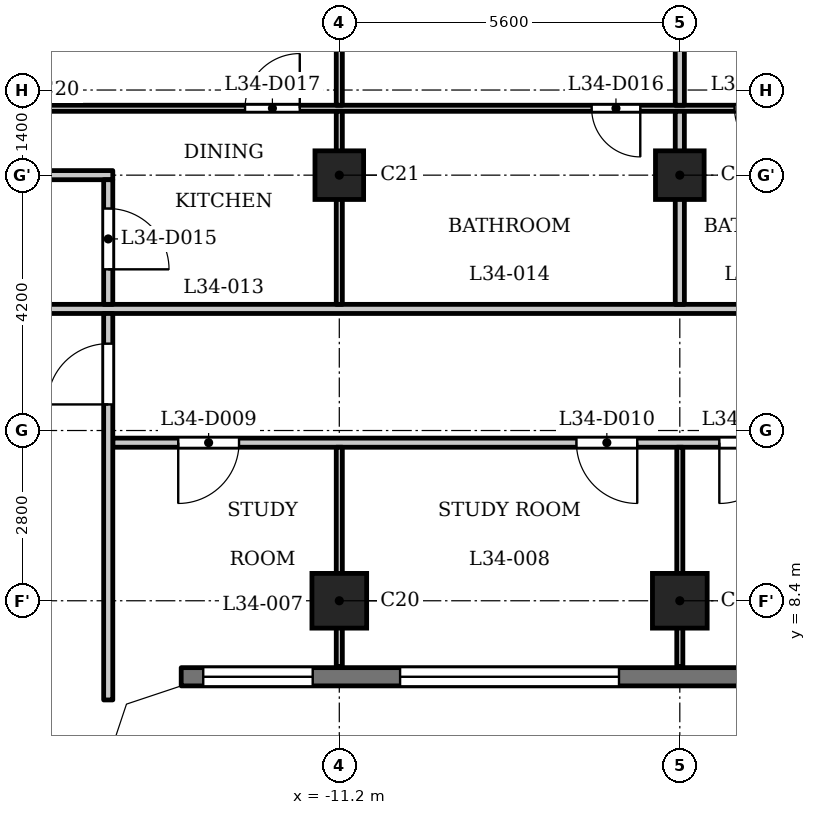
"""IFC4 building model, lengths in metres.
Left out: names, types, materials, properties, quantities, classifications, styles, units other than length and angle.
Written with IfcOpenShell. Run it as: python <this file> out.ifc"""

import sys

from ifc_helpers import new_model, si_unit, direction, frame, frame_2d, origin, origin_2d, place, context, subcontext, project, spatial, polyline, rectangle, outline, extrude, element, fill, save


model = new_model("IFC4")
c1 = context("Model", 3, precision=1e-05, world=origin(), true_north=direction((0.0, 1.0)))
c2 = subcontext(c1, "Body", "Model", "MODEL_VIEW")
j1 = project(units=[si_unit("LENGTHUNIT", "METRE"), si_unit("PLANEANGLEUNIT", "RADIAN")], contexts=[c1])
p1 = place(None, origin())
s1 = spatial("IfcSite", under=j1, at=p1, CompositionType="ELEMENT")
p2 = place(p1, origin())
s2 = spatial("IfcBuilding", under=s1, at=p2, CompositionType="ELEMENT")
p3 = place(p2, frame((0.0, 0.0, 136.1)))
s3 = spatial("IfcBuildingStorey", under=s2, at=p3, CompositionType="ELEMENT", Elevation=136.1)
for number, where, z_axis, x_axis in (
    (1, (-11.2, 8.4, 0.0), (0.0, 0.0, 1.0), (1.0, 0.0, 0.0)),
    (2, (-5.6, 8.4, 0.0), (0.0, 0.0, 1.0), (1.0, 0.0, 0.0)),
):
    element("IfcColumn", number, at=place(p3, frame(where, z_axis=z_axis, x_axis=x_axis)), inside=s3, PredefinedType="COLUMN", context=c2, shape_type="SweptSolid", body=[
        extrude(rectangle(XDim=0.9, YDim=0.9, at=origin_2d()), origin(), (0.0, 0.0, 1.0), 3.5),
    ])
for number, where, z_axis, x_axis in (
    (3, (-11.2, 15.4, 0.0), (0.0, 0.0, 1.0), (1.0, 0.0, 0.0)),
    (4, (-5.6, 15.4, 0.0), (0.0, 0.0, 1.0), (1.0, 0.0, 0.0)),
):
    element("IfcColumn", number, at=place(p3, frame(where, z_axis=z_axis, x_axis=x_axis)), inside=s3, PredefinedType="COLUMN", context=c2, shape_type="SweptSolid", body=[
        extrude(rectangle(XDim=0.8, YDim=0.8, at=origin_2d()), origin(), (0.0, 0.0, 1.0), 3.5),
    ])
p4 = place(p3, frame((-13.8, 7.15, 0.0), z_axis=(0.0, 0.0, 1.0), x_axis=(1.0, 0.0, 0.0)))
e5 = element("IfcWall", 5, at=p4, inside=s3, PredefinedType="SOLIDWALL", context=c2, shape_type="SweptSolid", body=[
    extrude(rectangle(XDim=27.6, YDim=0.3, at=frame_2d((13.8, 0.0))), origin(), (0.0, 0.0, 1.0), 3.2),
])
p5 = place(p4, frame((0.363, 0.0, 0.9)))
e6 = element("IfcOpeningElement", 6, at=p5, cuts=e5, PredefinedType="OPENING", context=c2, shape_type="SweptSolid", body=[
    extrude(rectangle(XDim=1.8, YDim=1.25, at=frame_2d((0.9, 0.625))), frame((0.0, 0.16, 0.0), z_axis=(0.0, -1.0, 0.0), x_axis=(1.0, 0.0, 0.0)), (0.0, 0.0, 1.0), 0.32),
])
p6 = place(p4, frame((3.6, 0.0, 1.2)))
e7 = element("IfcOpeningElement", 7, at=p6, cuts=e5, PredefinedType="OPENING", context=c2, shape_type="SweptSolid", body=[
    extrude(rectangle(XDim=3.6, YDim=0.95, at=frame_2d((1.8, 0.475))), frame((0.0, 0.16, 0.0), z_axis=(0.0, -1.0, 0.0), x_axis=(1.0, 0.0, 0.0)), (0.0, 0.0, 1.0), 0.32),
])
p7 = place(p4, frame((9.2, 0.0, 1.2)))
e8 = element("IfcOpeningElement", 8, at=p7, cuts=e5, PredefinedType="OPENING", context=c2, shape_type="SweptSolid", body=[
    extrude(rectangle(XDim=3.6, YDim=0.95, at=frame_2d((1.8, 0.475))), frame((0.0, 0.16, 0.0), z_axis=(0.0, -1.0, 0.0), x_axis=(1.0, 0.0, 0.0)), (0.0, 0.0, 1.0), 0.32),
])
p8 = place(p4, frame((14.8, 0.0, 1.2)))
e9 = element("IfcOpeningElement", 9, at=p8, cuts=e5, PredefinedType="OPENING", context=c2, shape_type="SweptSolid", body=[
    extrude(rectangle(XDim=3.6, YDim=0.95, at=frame_2d((1.8, 0.475))), frame((0.0, 0.16, 0.0), z_axis=(0.0, -1.0, 0.0), x_axis=(1.0, 0.0, 0.0)), (0.0, 0.0, 1.0), 0.32),
])
p9 = place(p4, frame((20.4, 0.0, 1.2)))
e10 = element("IfcOpeningElement", 10, at=p9, cuts=e5, PredefinedType="OPENING", context=c2, shape_type="SweptSolid", body=[
    extrude(rectangle(XDim=3.6, YDim=0.95, at=frame_2d((1.8, 0.475))), frame((0.0, 0.16, 0.0), z_axis=(0.0, -1.0, 0.0), x_axis=(1.0, 0.0, 0.0)), (0.0, 0.0, 1.0), 0.32),
])
p10 = place(p4, frame((25.438, 0.0, 0.9)))
e11 = element("IfcOpeningElement", 11, at=p10, cuts=e5, PredefinedType="OPENING", context=c2, shape_type="SweptSolid", body=[
    extrude(rectangle(XDim=1.8, YDim=1.25, at=frame_2d((0.9, 0.625))), frame((0.0, 0.16, 0.0), z_axis=(0.0, -1.0, 0.0), x_axis=(1.0, 0.0, 0.0)), (0.0, 0.0, 1.0), 0.32),
])
p11 = place(p3, frame((-14.925, 11.0, 0.0), z_axis=(0.0, 0.0, 1.0), x_axis=(1.0, 0.0, 0.0)))
e12 = element("IfcWall", 12, at=p11, inside=s3, PredefinedType="PARTITIONING", context=c2, shape_type="SweptSolid", body=[
    extrude(rectangle(XDim=29.85, YDim=0.15, at=frame_2d((14.925, 0.0))), origin(), (0.0, 0.0, 1.0), 3.2),
])
p12 = place(p11, frame((1.076, 0.0, 0.0)))
e13 = element("IfcOpeningElement", 13, at=p12, cuts=e12, PredefinedType="OPENING", context=c2, shape_type="SweptSolid", body=[
    extrude(rectangle(XDim=1.0, YDim=2.1, at=frame_2d((0.5, 1.05))), frame((0.0, 0.085, 0.0), z_axis=(0.0, -1.0, 0.0), x_axis=(1.0, 0.0, 0.0)), (0.0, 0.0, 1.0), 0.17),
])
p13 = place(p11, frame((7.625, 0.0, 0.0)))
e14 = element("IfcOpeningElement", 14, at=p13, cuts=e12, PredefinedType="OPENING", context=c2, shape_type="SweptSolid", body=[
    extrude(rectangle(XDim=1.0, YDim=2.1, at=frame_2d((0.5, 1.05))), frame((0.0, 0.085, 0.0), z_axis=(0.0, -1.0, 0.0), x_axis=(1.0, 0.0, 0.0)), (0.0, 0.0, 1.0), 0.17),
])
p14 = place(p11, frame((9.975, 0.0, 0.0)))
e15 = element("IfcOpeningElement", 15, at=p14, cuts=e12, PredefinedType="OPENING", context=c2, shape_type="SweptSolid", body=[
    extrude(rectangle(XDim=1.0, YDim=2.1, at=frame_2d((0.5, 1.05))), frame((0.0, 0.085, 0.0), z_axis=(0.0, -1.0, 0.0), x_axis=(1.0, 0.0, 0.0)), (0.0, 0.0, 1.0), 0.17),
])
p15 = place(p11, frame((18.825, 0.0, 0.0)))
e16 = element("IfcOpeningElement", 16, at=p15, cuts=e12, PredefinedType="OPENING", context=c2, shape_type="SweptSolid", body=[
    extrude(rectangle(XDim=1.0, YDim=2.1, at=frame_2d((0.5, 1.05))), frame((0.0, 0.085, 0.0), z_axis=(0.0, -1.0, 0.0), x_axis=(1.0, 0.0, 0.0)), (0.0, 0.0, 1.0), 0.17),
])
p16 = place(p11, frame((21.175, 0.0, 0.0)))
e17 = element("IfcOpeningElement", 17, at=p16, cuts=e12, PredefinedType="OPENING", context=c2, shape_type="SweptSolid", body=[
    extrude(rectangle(XDim=1.0, YDim=2.1, at=frame_2d((0.5, 1.05))), frame((0.0, 0.085, 0.0), z_axis=(0.0, -1.0, 0.0), x_axis=(1.0, 0.0, 0.0)), (0.0, 0.0, 1.0), 0.17),
])
p17 = place(p11, frame((27.775, 0.0, 0.0)))
e18 = element("IfcOpeningElement", 18, at=p17, cuts=e12, PredefinedType="OPENING", context=c2, shape_type="SweptSolid", body=[
    extrude(rectangle(XDim=1.0, YDim=2.1, at=frame_2d((0.5, 1.05))), frame((0.0, 0.085, 0.0), z_axis=(0.0, -1.0, 0.0), x_axis=(1.0, 0.0, 0.0)), (0.0, 0.0, 1.0), 0.17),
])
p18 = place(p3, frame((-17.4, 13.2, 0.0), z_axis=(0.0, 0.0, 1.0), x_axis=(1.0, 0.0, 0.0)))
e19 = element("IfcWall", 19, at=p18, inside=s3, PredefinedType="PARTITIONING", context=c2, shape_type="SweptSolid", body=[
    extrude(rectangle(XDim=34.8, YDim=0.15, at=frame_2d((17.4, 0.0))), origin(), (0.0, 0.0, 1.0), 3.2),
])
p19 = place(p18, frame((0.25, 0.0, 0.0)))
e20 = element("IfcOpeningElement", 20, at=p19, cuts=e19, PredefinedType="OPENING", context=c2, shape_type="SweptSolid", body=[
    extrude(rectangle(XDim=1.0, YDim=2.1, at=frame_2d((0.5, 1.05))), frame((0.0, 0.085, 0.0), z_axis=(0.0, -1.0, 0.0), x_axis=(1.0, 0.0, 0.0)), (0.0, 0.0, 1.0), 0.17),
])
p20 = place(p18, frame((33.65, 0.0, 0.0)))
e21 = element("IfcOpeningElement", 21, at=p20, cuts=e19, PredefinedType="OPENING", context=c2, shape_type="SweptSolid", body=[
    extrude(rectangle(XDim=1.0, YDim=2.1, at=frame_2d((0.5, 1.05))), frame((0.0, 0.085, 0.0), z_axis=(0.0, -1.0, 0.0), x_axis=(1.0, 0.0, 0.0)), (0.0, 0.0, 1.0), 0.17),
])
p21 = place(p18, frame((15.75, 0.0, 0.0)))
e22 = element("IfcOpeningElement", 22, at=p21, cuts=e19, PredefinedType="OPENING", context=c2, shape_type="SweptSolid", body=[
    extrude(rectangle(XDim=1.0, YDim=2.1, at=frame_2d((0.5, 1.05))), frame((0.0, 0.085, 0.0), z_axis=(0.0, -1.0, 0.0), x_axis=(1.0, 0.0, 0.0)), (0.0, 0.0, 1.0), 0.17),
])
p22 = place(p18, frame((19.35, 0.0, 0.0)))
e23 = element("IfcOpeningElement", 23, at=p22, cuts=e19, PredefinedType="OPENING", context=c2, shape_type="SweptSolid", body=[
    extrude(rectangle(XDim=1.0, YDim=2.1, at=frame_2d((0.5, 1.05))), frame((0.0, 0.085, 0.0), z_axis=(0.0, -1.0, 0.0), x_axis=(1.0, 0.0, 0.0)), (0.0, 0.0, 1.0), 0.17),
])
p23 = place(p18, frame((26.95, 0.0, 0.0)))
e24 = element("IfcOpeningElement", 24, at=p23, cuts=e19, PredefinedType="OPENING", context=c2, shape_type="SweptSolid", body=[
    extrude(rectangle(XDim=1.0, YDim=2.1, at=frame_2d((0.5, 1.05))), frame((0.0, 0.085, 0.0), z_axis=(0.0, -1.0, 0.0), x_axis=(1.0, 0.0, 0.0)), (0.0, 0.0, 1.0), 0.17),
])
p24 = place(p18, frame((29.75, 0.0, 0.0)))
e25 = element("IfcOpeningElement", 25, at=p24, cuts=e19, PredefinedType="OPENING", context=c2, shape_type="SweptSolid", body=[
    extrude(rectangle(XDim=1.0, YDim=2.1, at=frame_2d((0.5, 1.05))), frame((0.0, 0.085, 0.0), z_axis=(0.0, -1.0, 0.0), x_axis=(1.0, 0.0, 0.0)), (0.0, 0.0, 1.0), 0.17),
])
p25 = place(p3, frame((-27.484, 15.4, 0.0), z_axis=(0.0, 0.0, 1.0), x_axis=(1.0, 0.0, 0.0)))
e26 = element("IfcWall", 26, at=p25, inside=s3, PredefinedType="PARTITIONING", context=c2, shape_type="SweptSolid", body=[
    extrude(rectangle(XDim=12.559, YDim=0.15, at=frame_2d((6.279, 0.0))), origin(), (0.0, 0.0, 1.0), 3.2),
])
p26 = place(p25, frame((9.034, 0.0, 0.0)))
e27 = element("IfcOpeningElement", 27, at=p26, cuts=e26, PredefinedType="OPENING", context=c2, shape_type="SweptSolid", body=[
    extrude(rectangle(XDim=1.0, YDim=2.1, at=frame_2d((0.5, 1.05))), frame((0.0, 0.085, 0.0), z_axis=(0.0, -1.0, 0.0), x_axis=(1.0, 0.0, 0.0)), (0.0, 0.0, 1.0), 0.17),
])
p27 = place(p3, frame((-16.725, 16.5, 0.0), z_axis=(0.0, 0.0, 1.0), x_axis=(1.0, 0.0, 0.0)))
e28 = element("IfcWall", 28, at=p27, inside=s3, PredefinedType="PARTITIONING", context=c2, shape_type="SweptSolid", body=[
    extrude(rectangle(XDim=33.45, YDim=0.1, at=frame_2d((16.725, 0.0))), origin(), (0.0, 0.0, 1.0), 3.2),
])
p28 = place(p27, frame((9.675, 0.0, 0.0)))
e29 = element("IfcOpeningElement", 29, at=p28, cuts=e28, PredefinedType="OPENING", context=c2, shape_type="SweptSolid", body=[
    extrude(rectangle(XDim=0.8, YDim=2.1, at=frame_2d((0.4, 1.05))), frame((0.0, 0.06, 0.0), z_axis=(0.0, -1.0, 0.0), x_axis=(1.0, 0.0, 0.0)), (0.0, 0.0, 1.0), 0.12),
])
p29 = place(p27, frame((3.975, 0.0, 0.0)))
e30 = element("IfcOpeningElement", 30, at=p29, cuts=e28, PredefinedType="OPENING", context=c2, shape_type="SweptSolid", body=[
    extrude(rectangle(XDim=0.9, YDim=2.1, at=frame_2d((0.45, 1.05))), frame((0.0, 0.06, 0.0), z_axis=(0.0, -1.0, 0.0), x_axis=(1.0, 0.0, 0.0)), (0.0, 0.0, 1.0), 0.12),
])
p30 = place(p27, frame((12.025, 0.0, 0.0)))
e31 = element("IfcOpeningElement", 31, at=p30, cuts=e28, PredefinedType="OPENING", context=c2, shape_type="SweptSolid", body=[
    extrude(rectangle(XDim=0.8, YDim=2.1, at=frame_2d((0.4, 1.05))), frame((0.0, 0.06, 0.0), z_axis=(0.0, -1.0, 0.0), x_axis=(1.0, 0.0, 0.0)), (0.0, 0.0, 1.0), 0.12),
])
p31 = place(p27, frame((15.175, 0.0, 0.0)))
e32 = element("IfcOpeningElement", 32, at=p31, cuts=e28, PredefinedType="OPENING", context=c2, shape_type="SweptSolid", body=[
    extrude(rectangle(XDim=0.9, YDim=2.1, at=frame_2d((0.45, 1.05))), frame((0.0, 0.06, 0.0), z_axis=(0.0, -1.0, 0.0), x_axis=(1.0, 0.0, 0.0)), (0.0, 0.0, 1.0), 0.12),
])
p32 = place(p27, frame((20.975, 0.0, 0.0)))
e33 = element("IfcOpeningElement", 33, at=p32, cuts=e28, PredefinedType="OPENING", context=c2, shape_type="SweptSolid", body=[
    extrude(rectangle(XDim=0.8, YDim=2.1, at=frame_2d((0.4, 1.05))), frame((0.0, 0.06, 0.0), z_axis=(0.0, -1.0, 0.0), x_axis=(1.0, 0.0, 0.0)), (0.0, 0.0, 1.0), 0.12),
])
p33 = place(p27, frame((18.175, 0.0, 0.0)))
e34 = element("IfcOpeningElement", 34, at=p33, cuts=e28, PredefinedType="OPENING", context=c2, shape_type="SweptSolid", body=[
    extrude(rectangle(XDim=0.9, YDim=2.1, at=frame_2d((0.45, 1.05))), frame((0.0, 0.06, 0.0), z_axis=(0.0, -1.0, 0.0), x_axis=(1.0, 0.0, 0.0)), (0.0, 0.0, 1.0), 0.12),
])
p34 = place(p27, frame((23.725, 0.0, 0.0)))
e35 = element("IfcOpeningElement", 35, at=p34, cuts=e28, PredefinedType="OPENING", context=c2, shape_type="SweptSolid", body=[
    extrude(rectangle(XDim=0.8, YDim=2.1, at=frame_2d((0.4, 1.05))), frame((0.0, 0.06, 0.0), z_axis=(0.0, -1.0, 0.0), x_axis=(1.0, 0.0, 0.0)), (0.0, 0.0, 1.0), 0.12),
])
p35 = place(p27, frame((26.125, 0.0, 0.0)))
e36 = element("IfcOpeningElement", 36, at=p35, cuts=e28, PredefinedType="OPENING", context=c2, shape_type="SweptSolid", body=[
    extrude(rectangle(XDim=0.9, YDim=2.1, at=frame_2d((0.45, 1.05))), frame((0.0, 0.06, 0.0), z_axis=(0.0, -1.0, 0.0), x_axis=(1.0, 0.0, 0.0)), (0.0, 0.0, 1.0), 0.12),
])
p36 = place(p27, frame((32.125, 0.0, 0.0)))
e37 = element("IfcOpeningElement", 37, at=p36, cuts=e28, PredefinedType="OPENING", context=c2, shape_type="SweptSolid", body=[
    extrude(rectangle(XDim=0.8, YDim=2.1, at=frame_2d((0.4, 1.05))), frame((0.0, 0.06, 0.0), z_axis=(0.0, -1.0, 0.0), x_axis=(1.0, 0.0, 0.0)), (0.0, 0.0, 1.0), 0.12),
])
p37 = place(p27, frame((28.975, 0.0, 0.0)))
e38 = element("IfcOpeningElement", 38, at=p37, cuts=e28, PredefinedType="OPENING", context=c2, shape_type="SweptSolid", body=[
    extrude(rectangle(XDim=0.9, YDim=2.1, at=frame_2d((0.45, 1.05))), frame((0.0, 0.06, 0.0), z_axis=(0.0, -1.0, 0.0), x_axis=(1.0, 0.0, 0.0)), (0.0, 0.0, 1.0), 0.12),
])
p38 = place(p3, frame((-15.0, 6.769, 0.0), z_axis=(0.0, 0.0, 1.0), x_axis=(0.0, 1.0, 0.0)))
e39 = element("IfcWall", 39, at=p38, inside=s3, PredefinedType="PARTITIONING", context=c2, shape_type="SweptSolid", body=[
    extrude(rectangle(XDim=6.356, YDim=0.15, at=frame_2d((3.178, 0.0))), origin(), (0.0, 0.0, 1.0), 3.2),
])
p39 = place(p38, frame((4.86, 0.0, 0.0)))
e40 = element("IfcOpeningElement", 40, at=p39, cuts=e39, PredefinedType="OPENING", context=c2, shape_type="SweptSolid", body=[
    extrude(rectangle(XDim=1.0, YDim=2.1, at=frame_2d((0.5, 1.05))), frame((0.0, 0.085, 0.0), z_axis=(0.0, -1.0, 0.0), x_axis=(1.0, 0.0, 0.0)), (0.0, 0.0, 1.0), 0.17),
])
p40 = place(p3, frame((-15.0, 13.275, 0.0), z_axis=(0.0, 0.0, 1.0), x_axis=(0.0, 1.0, 0.0)))
e41 = element("IfcWall", 41, at=p40, inside=s3, PredefinedType="PARTITIONING", context=c2, shape_type="SweptSolid", body=[
    extrude(rectangle(XDim=2.05, YDim=0.15, at=frame_2d((1.025, 0.0))), origin(), (0.0, 0.0, 1.0), 3.2),
])
p41 = place(p40, frame((0.576, 0.0, 0.0)))
e42 = element("IfcOpeningElement", 42, at=p41, cuts=e41, PredefinedType="OPENING", context=c2, shape_type="SweptSolid", body=[
    extrude(rectangle(XDim=1.0, YDim=2.1, at=frame_2d((0.5, 1.05))), frame((0.0, 0.085, 0.0), z_axis=(0.0, -1.0, 0.0), x_axis=(1.0, 0.0, 0.0)), (0.0, 0.0, 1.0), 0.17),
])
p42 = place(p3, frame((-11.2, 7.32, 0.0), z_axis=(0.0, 0.0, 1.0), x_axis=(0.0, 1.0, 0.0)))
e43 = element("IfcWall", 43, at=p42, inside=s3, PredefinedType="PARTITIONING", context=c2, shape_type="SweptSolid", body=[
    extrude(rectangle(XDim=3.605, YDim=0.1, at=frame_2d((1.802, 0.0))), origin(), (0.0, 0.0, 1.0), 3.2),
])
p43 = place(p3, frame((-11.2, 13.275, 0.0), z_axis=(0.0, 0.0, 1.0), x_axis=(0.0, 1.0, 0.0)))
e44 = element("IfcWall", 44, at=p43, inside=s3, PredefinedType="PARTITIONING", context=c2, shape_type="SweptSolid", body=[
    extrude(rectangle(XDim=3.175, YDim=0.1, at=frame_2d((1.587, 0.0))), origin(), (0.0, 0.0, 1.0), 3.2),
])
p44 = place(p3, frame((-11.2, 16.55, 0.0), z_axis=(0.0, 0.0, 1.0), x_axis=(0.0, 1.0, 0.0)))
e45 = element("IfcWall", 45, at=p44, inside=s3, PredefinedType="PARTITIONING", context=c2, shape_type="SweptSolid", body=[
    extrude(rectangle(XDim=6.38, YDim=0.1, at=frame_2d((3.19, 0.0))), origin(), (0.0, 0.0, 1.0), 3.2),
])
p45 = place(p44, frame((4.1, 0.0, 0.0)))
e46 = element("IfcOpeningElement", 46, at=p45, cuts=e45, PredefinedType="OPENING", context=c2, shape_type="SweptSolid", body=[
    extrude(rectangle(XDim=0.9, YDim=2.1, at=frame_2d((0.45, 1.05))), frame((0.0, 0.06, 0.0), z_axis=(0.0, -1.0, 0.0), x_axis=(1.0, 0.0, 0.0)), (0.0, 0.0, 1.0), 0.12),
])
p46 = place(p3, frame((-5.6, 7.32, 0.0), z_axis=(0.0, 0.0, 1.0), x_axis=(0.0, 1.0, 0.0)))
e47 = element("IfcWall", 47, at=p46, inside=s3, PredefinedType="PARTITIONING", context=c2, shape_type="SweptSolid", body=[
    extrude(rectangle(XDim=3.605, YDim=0.1, at=frame_2d((1.802, 0.0))), origin(), (0.0, 0.0, 1.0), 3.2),
])
p47 = place(p3, frame((-5.6, 13.275, 0.0), z_axis=(0.0, 0.0, 1.0), x_axis=(0.0, 1.0, 0.0)))
e48 = element("IfcWall", 48, at=p47, inside=s3, PredefinedType="PARTITIONING", context=c2, shape_type="SweptSolid", body=[
    extrude(rectangle(XDim=3.175, YDim=0.15, at=frame_2d((1.587, 0.0))), origin(), (0.0, 0.0, 1.0), 3.2),
])
p48 = place(p3, frame((-5.6, 16.55, 0.0), z_axis=(0.0, 0.0, 1.0), x_axis=(0.0, 1.0, 0.0)))
e49 = element("IfcWall", 49, at=p48, inside=s3, PredefinedType="PARTITIONING", context=c2, shape_type="SweptSolid", body=[
    extrude(rectangle(XDim=6.38, YDim=0.15, at=frame_2d((3.19, 0.0))), origin(), (0.0, 0.0, 1.0), 3.2),
])
p49 = place(p3, origin())
e50 = element("IfcWall", 50, at=p49, inside=s3, PredefinedType="SOLIDWALL", context=c2, shape_type="SweptSolid", body=[
    extrude(outline(polyline([(-13.849, 7.3), (-14.937, 6.937), (-15.3, 5.849), (-15.3, 5.8), (-15.0, 5.8), (-14.7, 6.7), (-13.8, 7.0), (-13.8, 7.3), (-13.849, 7.3)])), origin(), (0.0, 0.0, 1.0), 3.2),
])
p50 = place(p39, origin())
e51 = element("IfcDoor", 51, at=p50, inside=s3, OperationType="SINGLE_SWING_RIGHT", PredefinedType="DOOR", context=c2, shape_type="SweptSolid", body=[
    extrude(rectangle(XDim=1.0, YDim=2.1, at=frame_2d((0.5, 1.05))), frame((0.0, 0.025, 0.0), z_axis=(0.0, -1.0, 0.0), x_axis=(1.0, 0.0, 0.0)), (0.0, 0.0, 1.0), 0.05),
])
fill(e40, e51)
p51 = place(p12, origin())
e52 = element("IfcDoor", 52, at=p51, inside=s3, OperationType="SINGLE_SWING_LEFT", PredefinedType="DOOR", context=c2, shape_type="SweptSolid", body=[
    extrude(rectangle(XDim=1.0, YDim=2.1, at=frame_2d((0.5, 1.05))), frame((0.0, 0.025, 0.0), z_axis=(0.0, -1.0, 0.0), x_axis=(1.0, 0.0, 0.0)), (0.0, 0.0, 1.0), 0.05),
])
fill(e13, e52)
p52 = place(p13, origin())
e53 = element("IfcDoor", 53, at=p52, inside=s3, OperationType="SINGLE_SWING_RIGHT", PredefinedType="DOOR", context=c2, shape_type="SweptSolid", body=[
    extrude(rectangle(XDim=1.0, YDim=2.1, at=frame_2d((0.5, 1.05))), frame((0.0, 0.025, 0.0), z_axis=(0.0, -1.0, 0.0), x_axis=(1.0, 0.0, 0.0)), (0.0, 0.0, 1.0), 0.05),
])
fill(e14, e53)
p53 = place(p14, origin())
e54 = element("IfcDoor", 54, at=p53, inside=s3, OperationType="SINGLE_SWING_LEFT", PredefinedType="DOOR", context=c2, shape_type="SweptSolid", body=[
    extrude(rectangle(XDim=1.0, YDim=2.1, at=frame_2d((0.5, 1.05))), frame((0.0, 0.025, 0.0), z_axis=(0.0, -1.0, 0.0), x_axis=(1.0, 0.0, 0.0)), (0.0, 0.0, 1.0), 0.05),
])
fill(e15, e54)
p54 = place(p41, origin())
e55 = element("IfcDoor", 55, at=p54, inside=s3, OperationType="SINGLE_SWING_LEFT", PredefinedType="DOOR", context=c2, shape_type="SweptSolid", body=[
    extrude(rectangle(XDim=1.0, YDim=2.1, at=frame_2d((0.5, 1.05))), frame((0.0, 0.025, 0.0), z_axis=(0.0, -1.0, 0.0), x_axis=(1.0, 0.0, 0.0)), (0.0, 0.0, 1.0), 0.05),
])
fill(e42, e55)
p55 = place(p28, origin())
e56 = element("IfcDoor", 56, at=p55, inside=s3, OperationType="SINGLE_SWING_RIGHT", PredefinedType="DOOR", context=c2, shape_type="SweptSolid", body=[
    extrude(rectangle(XDim=0.8, YDim=2.1, at=frame_2d((0.4, 1.05))), frame((0.0, 0.025, 0.0), z_axis=(0.0, -1.0, 0.0), x_axis=(1.0, 0.0, 0.0)), (0.0, 0.0, 1.0), 0.05),
])
fill(e29, e56)
p56 = place(p29, origin())
e57 = element("IfcDoor", 57, at=p56, inside=s3, OperationType="SINGLE_SWING_LEFT", PredefinedType="DOOR", context=c2, shape_type="SweptSolid", body=[
    extrude(rectangle(XDim=0.9, YDim=2.1, at=frame_2d((0.45, 1.05))), frame((0.0, 0.025, 0.0), z_axis=(0.0, -1.0, 0.0), x_axis=(1.0, 0.0, 0.0)), (0.0, 0.0, 1.0), 0.05),
])
fill(e30, e57)
p57 = place(p30, origin())
e58 = element("IfcDoor", 58, at=p57, inside=s3, OperationType="SINGLE_SWING_RIGHT", PredefinedType="DOOR", context=c2, shape_type="SweptSolid", body=[
    extrude(rectangle(XDim=0.8, YDim=2.1, at=frame_2d((0.4, 1.05))), frame((0.0, 0.025, 0.0), z_axis=(0.0, -1.0, 0.0), x_axis=(1.0, 0.0, 0.0)), (0.0, 0.0, 1.0), 0.05),
])
fill(e31, e58)
p58 = place(p5, origin())
e59 = element("IfcWindow", 59, at=p58, inside=s3, PartitioningType="SINGLE_PANEL", PredefinedType="WINDOW", context=c2, shape_type="SweptSolid", body=[
    extrude(rectangle(XDim=1.8, YDim=1.25, at=frame_2d((0.9, 0.625))), frame((0.0, 0.03, 0.0), z_axis=(0.0, -1.0, 0.0), x_axis=(1.0, 0.0, 0.0)), (0.0, 0.0, 1.0), 0.06),
])
fill(e6, e59)
p59 = place(p6, origin())
e60 = element("IfcWindow", 60, at=p59, inside=s3, PartitioningType="SINGLE_PANEL", PredefinedType="WINDOW", context=c2, shape_type="SweptSolid", body=[
    extrude(rectangle(XDim=3.6, YDim=0.95, at=frame_2d((1.8, 0.475))), frame((0.0, 0.03, 0.0), z_axis=(0.0, -1.0, 0.0), x_axis=(1.0, 0.0, 0.0)), (0.0, 0.0, 1.0), 0.06),
])
fill(e7, e60)
save(model, sys.argv[1])
